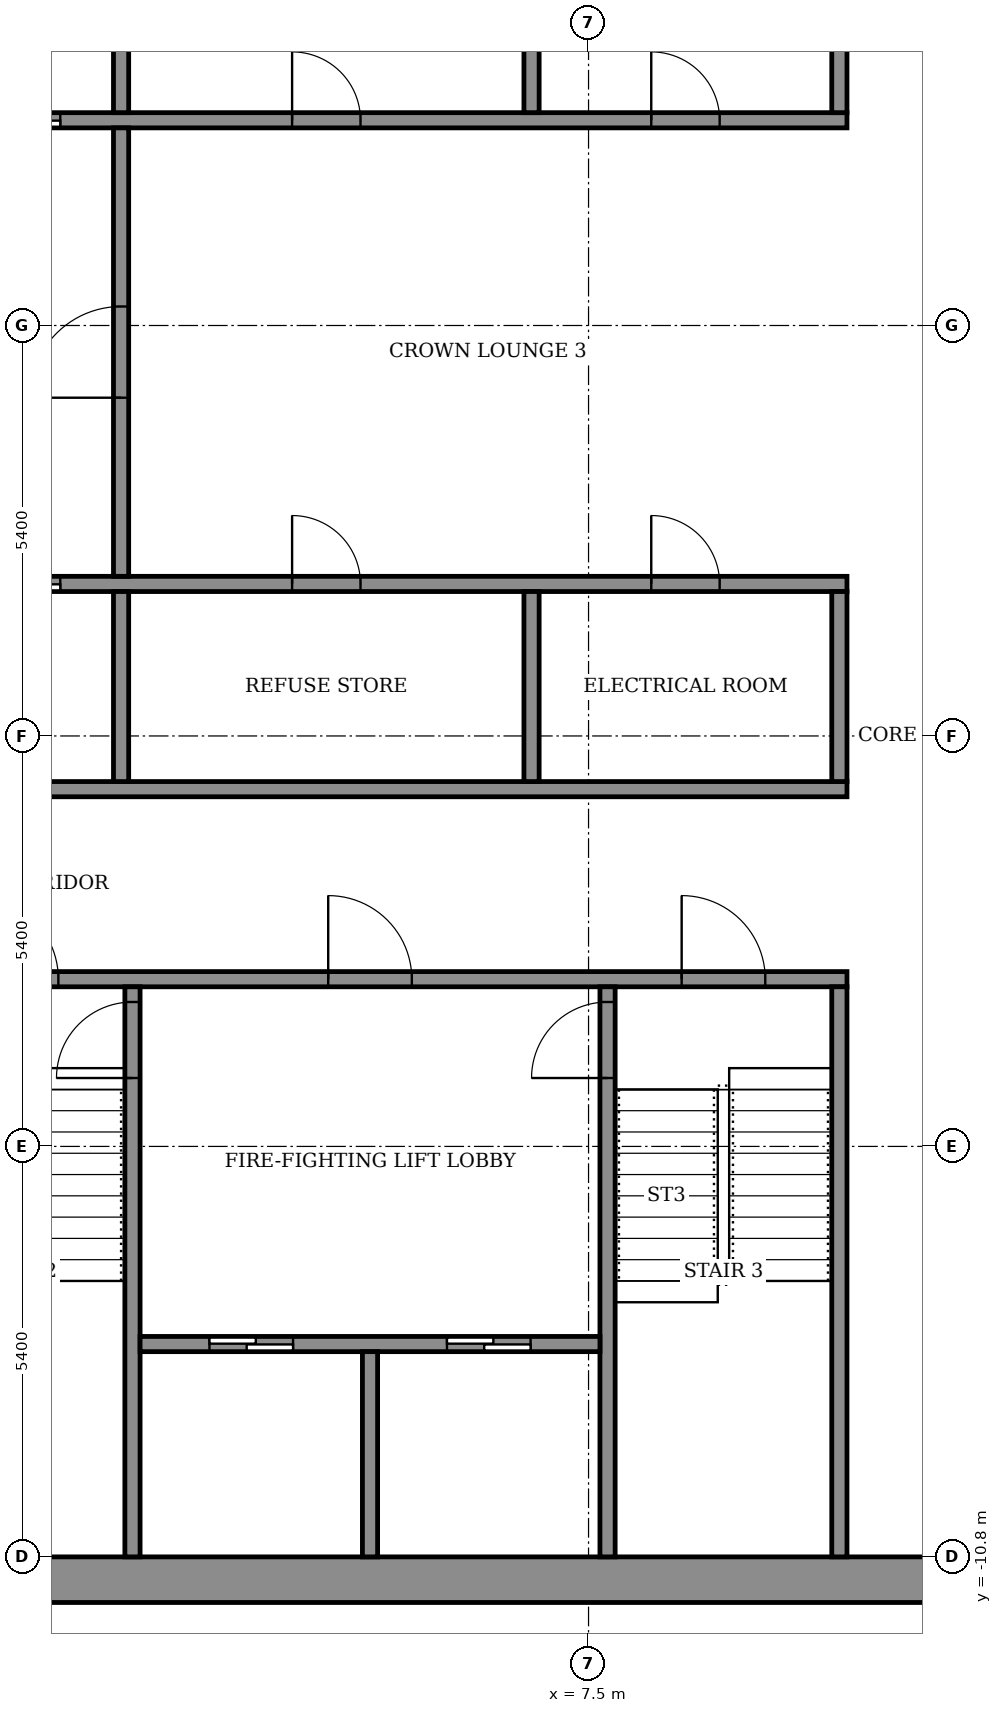
"""IFC4 building model, lengths in metres.
Left out: names, types, materials, properties, quantities, classifications, styles, units other than length and angle.
Written with IfcOpenShell. Run it as: python <this file> out.ifc"""

import sys

from ifc_helpers import new_model, si_unit, direction, frame, frame_2d, origin, place, context, subcontext, project, spatial, rectangle, extrude, element, fill, save


model = new_model("IFC4")
c1 = context("Model", 3, precision=1e-05, world=origin(), true_north=direction((0.0, 1.0)))
c2 = subcontext(c1, "Body", "Model", "MODEL_VIEW")
j1 = project(units=[si_unit("LENGTHUNIT", "METRE"), si_unit("PLANEANGLEUNIT", "RADIAN")], contexts=[c1])
p1 = place(None, origin())
s1 = spatial("IfcSite", under=j1, at=p1, CompositionType="ELEMENT")
p2 = place(p1, origin())
s2 = spatial("IfcBuilding", under=s1, at=p2, CompositionType="ELEMENT")
p3 = place(p2, frame((0.0, 0.0, 350.7)))
s3 = spatial("IfcBuildingStorey", under=s2, at=p3, CompositionType="ELEMENT", Elevation=350.7)
p4 = place(p3, frame((-14.4, -11.1, 0.0), z_axis=(0.0, 0.0, 1.0), x_axis=(1.0, 0.0, 0.0)))
e1 = element("IfcWall", 1, at=p4, inside=s3, PredefinedType="SHEAR", context=c2, shape_type="SweptSolid", body=[
    extrude(rectangle(XDim=28.8, YDim=0.6, at=frame_2d((14.4, 0.0))), origin(), (0.0, 0.0, 1.0), 3.6),
])
p5 = place(p3, frame((-10.9, -3.2, 0.0), z_axis=(0.0, 0.0, 1.0), x_axis=(1.0, 0.0, 0.0)))
e2 = element("IfcWall", 2, at=p5, inside=s3, PredefinedType="SHEAR", context=c2, shape_type="SweptSolid", body=[
    extrude(rectangle(XDim=21.8, YDim=0.2, at=frame_2d((10.9, 0.0))), origin(), (0.0, 0.0, 1.0), 3.05),
])
p6 = place(p5, frame((1.075, 0.0, 0.0)))
e3 = element("IfcOpeningElement", 3, at=p6, cuts=e2, PredefinedType="OPENING", context=c2, shape_type="SweptSolid", body=[
    extrude(rectangle(XDim=1.1, YDim=2.1, at=frame_2d((0.55, 1.05))), frame((0.0, 0.11, 0.0), z_axis=(0.0, -1.0, 0.0), x_axis=(1.0, 0.0, 0.0)), (0.0, 0.0, 1.0), 0.22),
])
p7 = place(p5, frame((10.325, 0.0, 0.0)))
e4 = element("IfcOpeningElement", 4, at=p7, cuts=e2, PredefinedType="OPENING", context=c2, shape_type="SweptSolid", body=[
    extrude(rectangle(XDim=1.1, YDim=2.1, at=frame_2d((0.55, 1.05))), frame((0.0, 0.11, 0.0), z_axis=(0.0, -1.0, 0.0), x_axis=(1.0, 0.0, 0.0)), (0.0, 0.0, 1.0), 0.22),
])
p8 = place(p5, frame((19.625, 0.0, 0.0)))
e5 = element("IfcOpeningElement", 5, at=p8, cuts=e2, PredefinedType="OPENING", context=c2, shape_type="SweptSolid", body=[
    extrude(rectangle(XDim=1.1, YDim=2.1, at=frame_2d((0.55, 1.05))), frame((0.0, 0.11, 0.0), z_axis=(0.0, -1.0, 0.0), x_axis=(1.0, 0.0, 0.0)), (0.0, 0.0, 1.0), 0.22),
])
p9 = place(p5, frame((5.7, 0.0, 0.0)))
e6 = element("IfcOpeningElement", 6, at=p9, cuts=e2, PredefinedType="OPENING", context=c2, shape_type="SweptSolid", body=[
    extrude(rectangle(XDim=1.1, YDim=2.1, at=frame_2d((0.55, 1.05))), frame((0.0, 0.11, 0.0), z_axis=(0.0, -1.0, 0.0), x_axis=(1.0, 0.0, 0.0)), (0.0, 0.0, 1.0), 0.22),
])
p10 = place(p5, frame((14.975, 0.0, 0.0)))
e7 = element("IfcOpeningElement", 7, at=p10, cuts=e2, PredefinedType="OPENING", context=c2, shape_type="SweptSolid", body=[
    extrude(rectangle(XDim=1.1, YDim=2.1, at=frame_2d((0.55, 1.05))), frame((0.0, 0.11, 0.0), z_axis=(0.0, -1.0, 0.0), x_axis=(1.0, 0.0, 0.0)), (0.0, 0.0, 1.0), 0.22),
])
p11 = place(p3, frame((-10.9, -0.7, 0.0), z_axis=(0.0, 0.0, 1.0), x_axis=(1.0, 0.0, 0.0)))
e8 = element("IfcWall", 8, at=p11, inside=s3, PredefinedType="SHEAR", context=c2, shape_type="SweptSolid", body=[
    extrude(rectangle(XDim=21.8, YDim=0.2, at=frame_2d((10.9, 0.0))), origin(), (0.0, 0.0, 1.0), 3.05),
])
p12 = place(p3, frame((-10.9, 2.0, 0.0), z_axis=(0.0, 0.0, 1.0), x_axis=(1.0, 0.0, 0.0)))
e9 = element("IfcWall", 9, at=p12, inside=s3, PredefinedType="SHEAR", context=c2, shape_type="SweptSolid", body=[
    extrude(rectangle(XDim=21.8, YDim=0.2, at=frame_2d((10.9, 0.0))), origin(), (0.0, 0.0, 1.0), 3.05),
])
p13 = place(p12, frame((4.95, 0.0, 0.0)))
e10 = element("IfcOpeningElement", 10, at=p13, cuts=e9, PredefinedType="OPENING", context=c2, shape_type="SweptSolid", body=[
    extrude(rectangle(XDim=1.1, YDim=2.1, at=frame_2d((0.55, 1.05))), frame((0.0, 0.11, 0.0), z_axis=(0.0, -1.0, 0.0), x_axis=(1.0, 0.0, 0.0)), (0.0, 0.0, 1.0), 0.22),
])
p14 = place(p12, frame((7.65, 0.0, 0.0)))
e11 = element("IfcOpeningElement", 11, at=p14, cuts=e9, PredefinedType="OPENING", context=c2, shape_type="SweptSolid", body=[
    extrude(rectangle(XDim=1.1, YDim=2.1, at=frame_2d((0.55, 1.05))), frame((0.0, 0.11, 0.0), z_axis=(0.0, -1.0, 0.0), x_axis=(1.0, 0.0, 0.0)), (0.0, 0.0, 1.0), 0.22),
])
p15 = place(p12, frame((10.35, 0.0, 0.0)))
e12 = element("IfcOpeningElement", 12, at=p15, cuts=e9, PredefinedType="OPENING", context=c2, shape_type="SweptSolid", body=[
    extrude(rectangle(XDim=1.1, YDim=2.1, at=frame_2d((0.55, 1.05))), frame((0.0, 0.11, 0.0), z_axis=(0.0, -1.0, 0.0), x_axis=(1.0, 0.0, 0.0)), (0.0, 0.0, 1.0), 0.22),
])
p16 = place(p12, frame((1.675, 0.0, 0.0)))
e13 = element("IfcOpeningElement", 13, at=p16, cuts=e9, PredefinedType="OPENING", context=c2, shape_type="SweptSolid", body=[
    extrude(rectangle(XDim=0.9, YDim=2.1, at=frame_2d((0.45, 1.05))), frame((0.0, 0.11, 0.0), z_axis=(0.0, -1.0, 0.0), x_axis=(1.0, 0.0, 0.0)), (0.0, 0.0, 1.0), 0.22),
])
p17 = place(p12, frame((14.5, 0.0, 0.0)))
e14 = element("IfcOpeningElement", 14, at=p17, cuts=e9, PredefinedType="OPENING", context=c2, shape_type="SweptSolid", body=[
    extrude(rectangle(XDim=0.9, YDim=2.1, at=frame_2d((0.45, 1.05))), frame((0.0, 0.11, 0.0), z_axis=(0.0, -1.0, 0.0), x_axis=(1.0, 0.0, 0.0)), (0.0, 0.0, 1.0), 0.22),
])
p18 = place(p12, frame((19.225, 0.0, 0.0)))
e15 = element("IfcOpeningElement", 15, at=p18, cuts=e9, PredefinedType="OPENING", context=c2, shape_type="SweptSolid", body=[
    extrude(rectangle(XDim=0.9, YDim=2.1, at=frame_2d((0.45, 1.05))), frame((0.0, 0.11, 0.0), z_axis=(0.0, -1.0, 0.0), x_axis=(1.0, 0.0, 0.0)), (0.0, 0.0, 1.0), 0.22),
])
p19 = place(p3, frame((-10.9, 8.1, 0.0), z_axis=(0.0, 0.0, 1.0), x_axis=(1.0, 0.0, 0.0)))
e16 = element("IfcWall", 16, at=p19, inside=s3, PredefinedType="SHEAR", context=c2, shape_type="SweptSolid", body=[
    extrude(rectangle(XDim=21.8, YDim=0.2, at=frame_2d((10.9, 0.0))), origin(), (0.0, 0.0, 1.0), 3.05),
])
p20 = place(p19, frame((4.95, 0.0, 0.0)))
e17 = element("IfcOpeningElement", 17, at=p20, cuts=e16, PredefinedType="OPENING", context=c2, shape_type="SweptSolid", body=[
    extrude(rectangle(XDim=1.1, YDim=2.1, at=frame_2d((0.55, 1.05))), frame((0.0, 0.11, 0.0), z_axis=(0.0, -1.0, 0.0), x_axis=(1.0, 0.0, 0.0)), (0.0, 0.0, 1.0), 0.22),
])
p21 = place(p19, frame((7.65, 0.0, 0.0)))
e18 = element("IfcOpeningElement", 18, at=p21, cuts=e16, PredefinedType="OPENING", context=c2, shape_type="SweptSolid", body=[
    extrude(rectangle(XDim=1.1, YDim=2.1, at=frame_2d((0.55, 1.05))), frame((0.0, 0.11, 0.0), z_axis=(0.0, -1.0, 0.0), x_axis=(1.0, 0.0, 0.0)), (0.0, 0.0, 1.0), 0.22),
])
p22 = place(p19, frame((10.35, 0.0, 0.0)))
e19 = element("IfcOpeningElement", 19, at=p22, cuts=e16, PredefinedType="OPENING", context=c2, shape_type="SweptSolid", body=[
    extrude(rectangle(XDim=1.1, YDim=2.1, at=frame_2d((0.55, 1.05))), frame((0.0, 0.11, 0.0), z_axis=(0.0, -1.0, 0.0), x_axis=(1.0, 0.0, 0.0)), (0.0, 0.0, 1.0), 0.22),
])
p23 = place(p19, frame((1.675, 0.0, 0.0)))
e20 = element("IfcOpeningElement", 20, at=p23, cuts=e16, PredefinedType="OPENING", context=c2, shape_type="SweptSolid", body=[
    extrude(rectangle(XDim=0.9, YDim=2.1, at=frame_2d((0.45, 1.05))), frame((0.0, 0.11, 0.0), z_axis=(0.0, -1.0, 0.0), x_axis=(1.0, 0.0, 0.0)), (0.0, 0.0, 1.0), 0.22),
])
p24 = place(p19, frame((14.5, 0.0, 0.0)))
e21 = element("IfcOpeningElement", 21, at=p24, cuts=e16, PredefinedType="OPENING", context=c2, shape_type="SweptSolid", body=[
    extrude(rectangle(XDim=0.9, YDim=2.1, at=frame_2d((0.45, 1.05))), frame((0.0, 0.11, 0.0), z_axis=(0.0, -1.0, 0.0), x_axis=(1.0, 0.0, 0.0)), (0.0, 0.0, 1.0), 0.22),
])
p25 = place(p19, frame((19.225, 0.0, 0.0)))
e22 = element("IfcOpeningElement", 22, at=p25, cuts=e16, PredefinedType="OPENING", context=c2, shape_type="SweptSolid", body=[
    extrude(rectangle(XDim=0.9, YDim=2.1, at=frame_2d((0.45, 1.05))), frame((0.0, 0.11, 0.0), z_axis=(0.0, -1.0, 0.0), x_axis=(1.0, 0.0, 0.0)), (0.0, 0.0, 1.0), 0.22),
])
p26 = place(p3, frame((1.5, -10.8, 0.0), z_axis=(0.0, 0.0, 1.0), x_axis=(0.0, 1.0, 0.0)))
e23 = element("IfcWall", 23, at=p26, inside=s3, PredefinedType="SHEAR", context=c2, shape_type="SweptSolid", body=[
    extrude(rectangle(XDim=7.5, YDim=0.2, at=frame_2d((3.75, 0.0))), origin(), (0.0, 0.0, 1.0), 3.05),
])
p27 = place(p26, frame((6.3, 0.0, 0.0)))
e24 = element("IfcOpeningElement", 24, at=p27, cuts=e23, PredefinedType="OPENING", context=c2, shape_type="SweptSolid", body=[
    extrude(rectangle(XDim=1.0, YDim=2.1, at=frame_2d((0.5, 1.05))), frame((0.0, 0.11, 0.0), z_axis=(0.0, -1.0, 0.0), x_axis=(1.0, 0.0, 0.0)), (0.0, 0.0, 1.0), 0.22),
])
p28 = place(p3, frame((7.75, -10.8, 0.0), z_axis=(0.0, 0.0, 1.0), x_axis=(0.0, 1.0, 0.0)))
e25 = element("IfcWall", 25, at=p28, inside=s3, PredefinedType="SHEAR", context=c2, shape_type="SweptSolid", body=[
    extrude(rectangle(XDim=7.5, YDim=0.2, at=frame_2d((3.75, 0.0))), origin(), (0.0, 0.0, 1.0), 3.05),
])
p29 = place(p28, frame((6.3, 0.0, 0.0)))
e26 = element("IfcOpeningElement", 26, at=p29, cuts=e25, PredefinedType="OPENING", context=c2, shape_type="SweptSolid", body=[
    extrude(rectangle(XDim=1.0, YDim=2.1, at=frame_2d((0.5, 1.05))), frame((0.0, 0.11, 0.0), z_axis=(0.0, -1.0, 0.0), x_axis=(1.0, 0.0, 0.0)), (0.0, 0.0, 1.0), 0.22),
])
p30 = place(p3, frame((10.8, -10.8, 0.0), z_axis=(0.0, 0.0, 1.0), x_axis=(0.0, 1.0, 0.0)))
e27 = element("IfcWall", 27, at=p30, inside=s3, PredefinedType="SHEAR", context=c2, shape_type="SweptSolid", body=[
    extrude(rectangle(XDim=7.5, YDim=0.2, at=frame_2d((3.75, 0.0))), origin(), (0.0, 0.0, 1.0), 3.05),
])
p31 = place(p3, frame((1.6, -8.0, 0.0), z_axis=(0.0, 0.0, 1.0), x_axis=(1.0, 0.0, 0.0)))
e28 = element("IfcWall", 28, at=p31, inside=s3, PredefinedType="SHEAR", context=c2, shape_type="SweptSolid", body=[
    extrude(rectangle(XDim=6.05, YDim=0.2, at=frame_2d((3.025, 0.0))), origin(), (0.0, 0.0, 1.0), 3.05),
])
p32 = place(p31, frame((0.913, 0.0, 0.0)))
e29 = element("IfcOpeningElement", 29, at=p32, cuts=e28, PredefinedType="OPENING", context=c2, shape_type="SweptSolid", body=[
    extrude(rectangle(XDim=1.1, YDim=2.1, at=frame_2d((0.55, 1.05))), frame((0.0, 0.11, 0.0), z_axis=(0.0, -1.0, 0.0), x_axis=(1.0, 0.0, 0.0)), (0.0, 0.0, 1.0), 0.22),
])
p33 = place(p31, frame((4.038, 0.0, 0.0)))
e30 = element("IfcOpeningElement", 30, at=p33, cuts=e28, PredefinedType="OPENING", context=c2, shape_type="SweptSolid", body=[
    extrude(rectangle(XDim=1.1, YDim=2.1, at=frame_2d((0.55, 1.05))), frame((0.0, 0.11, 0.0), z_axis=(0.0, -1.0, 0.0), x_axis=(1.0, 0.0, 0.0)), (0.0, 0.0, 1.0), 0.22),
])
p34 = place(p3, frame((4.625, -10.8, 0.0), z_axis=(0.0, 0.0, 1.0), x_axis=(0.0, 1.0, 0.0)))
e31 = element("IfcWall", 31, at=p34, inside=s3, PredefinedType="SHEAR", context=c2, shape_type="SweptSolid", body=[
    extrude(rectangle(XDim=2.7, YDim=0.2, at=frame_2d((1.35, 0.0))), origin(), (0.0, 0.0, 1.0), 3.05),
])
p35 = place(p3, frame((1.35, -0.6, 0.0), z_axis=(0.0, 0.0, 1.0), x_axis=(0.0, 1.0, 0.0)))
e32 = element("IfcWall", 32, at=p35, inside=s3, PredefinedType="SHEAR", context=c2, shape_type="SweptSolid", body=[
    extrude(rectangle(XDim=2.5, YDim=0.2, at=frame_2d((1.25, 0.0))), origin(), (0.0, 0.0, 1.0), 3.05),
])
for number, where, z_axis, x_axis in (
    (33, (6.75, -0.6, 0.0), (0.0, 0.0, 1.0), (0.0, 1.0, 0.0)),
    (34, (10.8, -0.6, 0.0), (0.0, 0.0, 1.0), (0.0, 1.0, 0.0)),
):
    element("IfcWall", number, at=place(p3, frame(where, z_axis=z_axis, x_axis=x_axis)), inside=s3, PredefinedType="STANDARD", context=c2, shape_type="SweptSolid", body=[
        extrude(rectangle(XDim=2.5, YDim=0.2, at=frame_2d((1.25, 0.0))), origin(), (0.0, 0.0, 1.0), 3.05),
    ])
p36 = place(p3, frame((1.35, 8.2, 0.0), z_axis=(0.0, 0.0, 1.0), x_axis=(0.0, 1.0, 0.0)))
e35 = element("IfcWall", 35, at=p36, inside=s3, PredefinedType="SHEAR", context=c2, shape_type="SweptSolid", body=[
    extrude(rectangle(XDim=2.6, YDim=0.2, at=frame_2d((1.3, 0.0))), origin(), (0.0, 0.0, 1.0), 3.05),
])
for number, where, z_axis, x_axis in (
    (36, (6.75, 8.2, 0.0), (0.0, 0.0, 1.0), (0.0, 1.0, 0.0)),
    (37, (10.8, 8.2, 0.0), (0.0, 0.0, 1.0), (0.0, 1.0, 0.0)),
):
    element("IfcWall", number, at=place(p3, frame(where, z_axis=z_axis, x_axis=x_axis)), inside=s3, PredefinedType="STANDARD", context=c2, shape_type="SweptSolid", body=[
        extrude(rectangle(XDim=2.6, YDim=0.2, at=frame_2d((1.3, 0.0))), origin(), (0.0, 0.0, 1.0), 3.05),
    ])
p37 = place(p3, frame((1.35, 2.1, 0.0), z_axis=(0.0, 0.0, 1.0), x_axis=(0.0, 1.0, 0.0)))
e38 = element("IfcWall", 38, at=p37, inside=s3, PredefinedType="STANDARD", context=c2, shape_type="SweptSolid", body=[
    extrude(rectangle(XDim=5.9, YDim=0.2, at=frame_2d((2.95, 0.0))), origin(), (0.0, 0.0, 1.0), 3.05),
])
p38 = place(p37, frame((2.35, 0.0, 0.0)))
e39 = element("IfcOpeningElement", 39, at=p38, cuts=e38, PredefinedType="OPENING", context=c2, shape_type="SweptSolid", body=[
    extrude(rectangle(XDim=1.2, YDim=2.1, at=frame_2d((0.6, 1.05))), frame((0.0, 0.11, 0.0), z_axis=(0.0, -1.0, 0.0), x_axis=(1.0, 0.0, 0.0)), (0.0, 0.0, 1.0), 0.22),
])
p39 = place(p15, origin())
e40 = element("IfcDoor", 40, at=p39, inside=s3, OperationType="SLIDING_TO_LEFT", PredefinedType="DOOR", context=c2, shape_type="SweptSolid", body=[
    extrude(rectangle(XDim=1.1, YDim=2.1, at=frame_2d((0.55, 1.05))), frame((0.0, 0.025, 0.0), z_axis=(0.0, -1.0, 0.0), x_axis=(1.0, 0.0, 0.0)), (0.0, 0.0, 1.0), 0.05),
])
fill(e12, e40)
p40 = place(p22, origin())
e41 = element("IfcDoor", 41, at=p40, inside=s3, OperationType="SLIDING_TO_LEFT", PredefinedType="DOOR", context=c2, shape_type="SweptSolid", body=[
    extrude(rectangle(XDim=1.1, YDim=2.1, at=frame_2d((0.55, 1.05))), frame((0.0, 0.025, 0.0), z_axis=(0.0, -1.0, 0.0), x_axis=(1.0, 0.0, 0.0)), (0.0, 0.0, 1.0), 0.05),
])
fill(e19, e41)
p41 = place(p17, origin())
e42 = element("IfcDoor", 42, at=p41, inside=s3, OperationType="SINGLE_SWING_RIGHT", PredefinedType="DOOR", context=c2, shape_type="SweptSolid", body=[
    extrude(rectangle(XDim=0.9, YDim=2.1, at=frame_2d((0.45, 1.05))), frame((0.0, 0.025, 0.0), z_axis=(0.0, -1.0, 0.0), x_axis=(1.0, 0.0, 0.0)), (0.0, 0.0, 1.0), 0.05),
])
fill(e14, e42)
p42 = place(p18, origin())
e43 = element("IfcDoor", 43, at=p42, inside=s3, OperationType="SINGLE_SWING_LEFT", PredefinedType="DOOR", context=c2, shape_type="SweptSolid", body=[
    extrude(rectangle(XDim=0.9, YDim=2.1, at=frame_2d((0.45, 1.05))), frame((0.0, 0.025, 0.0), z_axis=(0.0, -1.0, 0.0), x_axis=(1.0, 0.0, 0.0)), (0.0, 0.0, 1.0), 0.05),
])
fill(e15, e43)
p43 = place(p24, origin())
e44 = element("IfcDoor", 44, at=p43, inside=s3, OperationType="SINGLE_SWING_LEFT", PredefinedType="DOOR", context=c2, shape_type="SweptSolid", body=[
    extrude(rectangle(XDim=0.9, YDim=2.1, at=frame_2d((0.45, 1.05))), frame((0.0, 0.025, 0.0), z_axis=(0.0, -1.0, 0.0), x_axis=(1.0, 0.0, 0.0)), (0.0, 0.0, 1.0), 0.05),
])
fill(e21, e44)
p44 = place(p25, origin())
e45 = element("IfcDoor", 45, at=p44, inside=s3, OperationType="SINGLE_SWING_LEFT", PredefinedType="DOOR", context=c2, shape_type="SweptSolid", body=[
    extrude(rectangle(XDim=0.9, YDim=2.1, at=frame_2d((0.45, 1.05))), frame((0.0, 0.025, 0.0), z_axis=(0.0, -1.0, 0.0), x_axis=(1.0, 0.0, 0.0)), (0.0, 0.0, 1.0), 0.05),
])
fill(e22, e45)
p45 = place(p32, origin())
e46 = element("IfcDoor", 46, at=p45, inside=s3, OperationType="SLIDING_TO_LEFT", PredefinedType="DOOR", context=c2, shape_type="SweptSolid", body=[
    extrude(rectangle(XDim=1.1, YDim=2.1, at=frame_2d((0.55, 1.05))), frame((0.0, 0.025, 0.0), z_axis=(0.0, -1.0, 0.0), x_axis=(1.0, 0.0, 0.0)), (0.0, 0.0, 1.0), 0.05),
])
fill(e29, e46)
p46 = place(p33, origin())
e47 = element("IfcDoor", 47, at=p46, inside=s3, OperationType="SLIDING_TO_LEFT", PredefinedType="DOOR", context=c2, shape_type="SweptSolid", body=[
    extrude(rectangle(XDim=1.1, YDim=2.1, at=frame_2d((0.55, 1.05))), frame((0.0, 0.025, 0.0), z_axis=(0.0, -1.0, 0.0), x_axis=(1.0, 0.0, 0.0)), (0.0, 0.0, 1.0), 0.05),
])
fill(e30, e47)
p47 = place(p7, origin())
e48 = element("IfcDoor", 48, at=p47, inside=s3, OperationType="SINGLE_SWING_RIGHT", PredefinedType="DOOR", context=c2, shape_type="SweptSolid", body=[
    extrude(rectangle(XDim=1.1, YDim=2.1, at=frame_2d((0.55, 1.05))), frame((0.0, 0.025, 0.0), z_axis=(0.0, -1.0, 0.0), x_axis=(1.0, 0.0, 0.0)), (0.0, 0.0, 1.0), 0.05),
])
fill(e4, e48)
p48 = place(p8, origin())
e49 = element("IfcDoor", 49, at=p48, inside=s3, OperationType="SINGLE_SWING_RIGHT", PredefinedType="DOOR", context=c2, shape_type="SweptSolid", body=[
    extrude(rectangle(XDim=1.1, YDim=2.1, at=frame_2d((0.55, 1.05))), frame((0.0, 0.025, 0.0), z_axis=(0.0, -1.0, 0.0), x_axis=(1.0, 0.0, 0.0)), (0.0, 0.0, 1.0), 0.05),
])
fill(e5, e49)
p49 = place(p10, origin())
e50 = element("IfcDoor", 50, at=p49, inside=s3, OperationType="SINGLE_SWING_LEFT", PredefinedType="DOOR", context=c2, shape_type="SweptSolid", body=[
    extrude(rectangle(XDim=1.1, YDim=2.1, at=frame_2d((0.55, 1.05))), frame((0.0, 0.025, 0.0), z_axis=(0.0, -1.0, 0.0), x_axis=(1.0, 0.0, 0.0)), (0.0, 0.0, 1.0), 0.05),
])
fill(e7, e50)
p50 = place(p27, origin())
e51 = element("IfcDoor", 51, at=p50, inside=s3, OperationType="SINGLE_SWING_RIGHT", PredefinedType="DOOR", context=c2, shape_type="SweptSolid", body=[
    extrude(rectangle(XDim=1.0, YDim=2.1, at=frame_2d((0.5, 1.05))), frame((0.0, 0.025, 0.0), z_axis=(0.0, -1.0, 0.0), x_axis=(1.0, 0.0, 0.0)), (0.0, 0.0, 1.0), 0.05),
])
fill(e24, e51)
p51 = place(p29, origin())
e52 = element("IfcDoor", 52, at=p51, inside=s3, OperationType="SINGLE_SWING_RIGHT", PredefinedType="DOOR", context=c2, shape_type="SweptSolid", body=[
    extrude(rectangle(XDim=1.0, YDim=2.1, at=frame_2d((0.5, 1.05))), frame((0.0, 0.025, 0.0), z_axis=(0.0, -1.0, 0.0), x_axis=(1.0, 0.0, 0.0)), (0.0, 0.0, 1.0), 0.05),
])
fill(e26, e52)
p52 = place(p38, origin())
e53 = element("IfcDoor", 53, at=p52, inside=s3, OperationType="SINGLE_SWING_LEFT", PredefinedType="DOOR", context=c2, shape_type="SweptSolid", body=[
    extrude(rectangle(XDim=1.2, YDim=2.1, at=frame_2d((0.6, 1.05))), frame((0.0, 0.025, 0.0), z_axis=(0.0, -1.0, 0.0), x_axis=(1.0, 0.0, 0.0)), (0.0, 0.0, 1.0), 0.05),
])
fill(e39, e53)
save(model, sys.argv[1])
